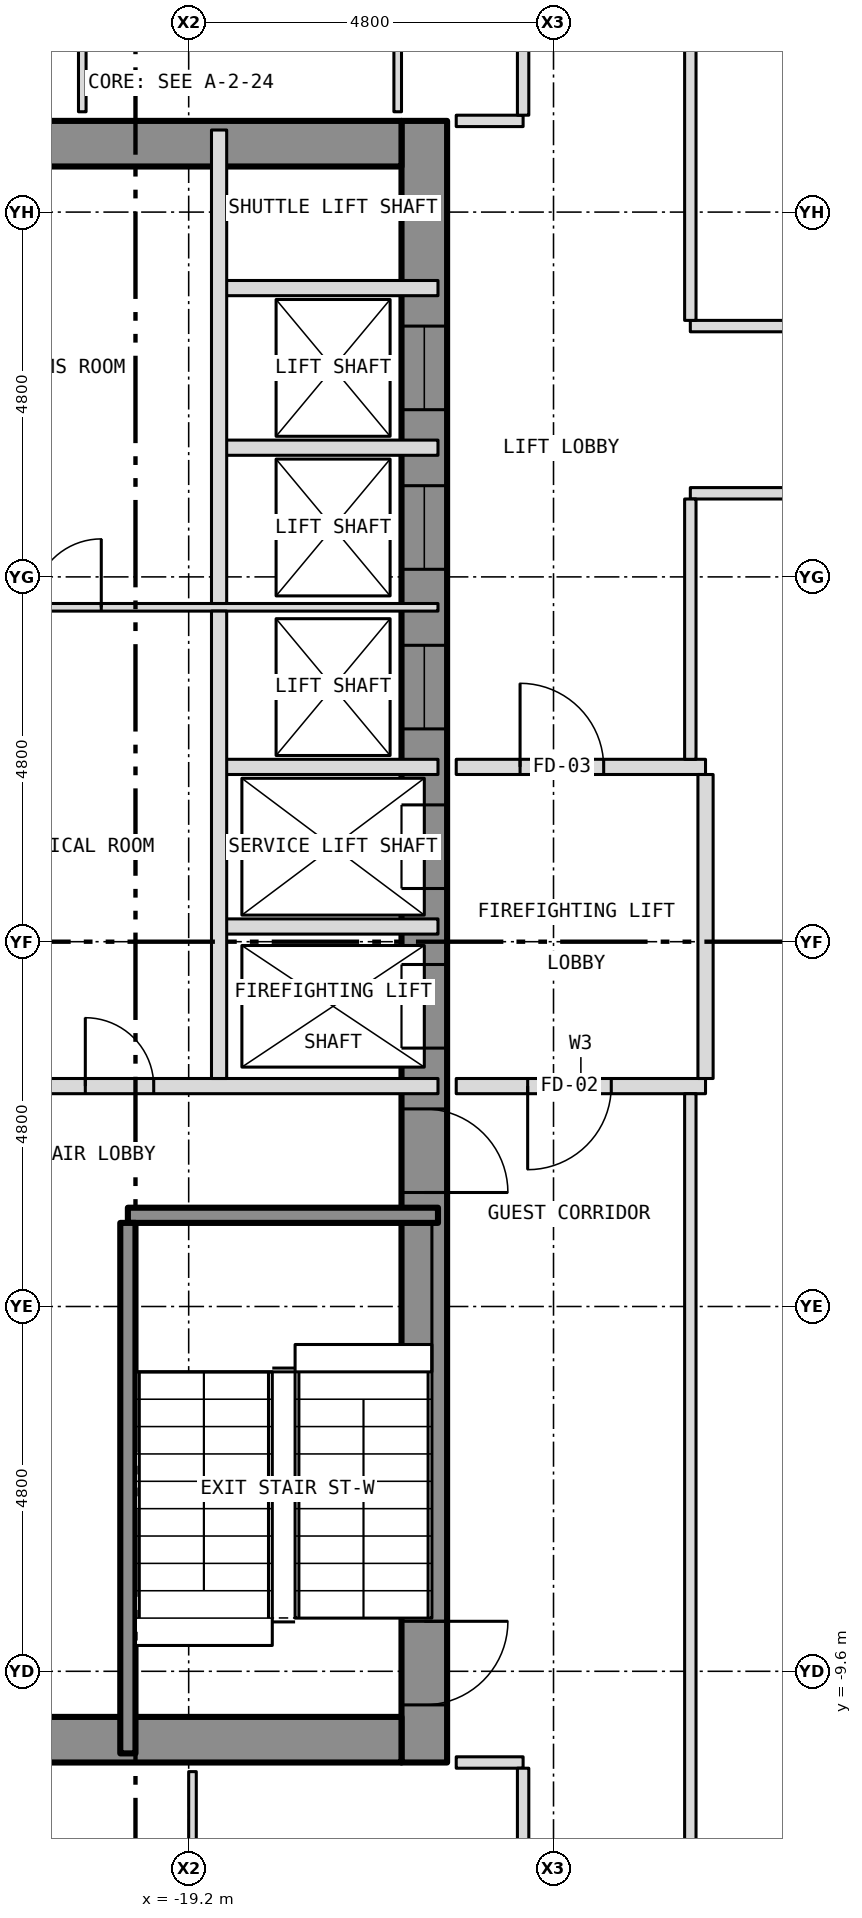
"""IFC4 building model, lengths in metres.
Left out: names, types, materials, properties, quantities, classifications, styles, units other than length and angle.
Written with IfcOpenShell. Run it as: python <this file> out.ifc"""

import sys

from ifc_helpers import new_model, si_unit, direction, frame, frame_2d, origin, place, context, subcontext, project, spatial, rectangle, extrude, element, fill, save


model = new_model("IFC4")
c1 = context("Model", 3, precision=1e-05, world=origin(), true_north=direction((0.0, 1.0)))
c2 = subcontext(c1, "Body", "Model", "MODEL_VIEW")
j1 = project(units=[si_unit("LENGTHUNIT", "METRE"), si_unit("PLANEANGLEUNIT", "RADIAN")], contexts=[c1])
p1 = place(None, origin())
s1 = spatial("IfcSite", under=j1, at=p1, CompositionType="ELEMENT")
p2 = place(p1, origin())
s2 = spatial("IfcBuilding", under=s1, at=p2, CompositionType="ELEMENT")
p3 = place(p2, frame((0.0, 0.0, 89.0)))
s3 = spatial("IfcBuildingStorey", under=s2, at=p3, CompositionType="ELEMENT", Elevation=89.0)
p4 = place(p3, frame((-16.1, -10.8, 0.0), z_axis=(0.0, 0.0, 1.0), x_axis=(0.0, 1.0, 0.0)))
e1 = element("IfcWall", 1, at=p4, inside=s3, PredefinedType="SHEAR", context=c2, shape_type="SweptSolid", body=[
    extrude(rectangle(XDim=21.6, YDim=0.6, at=frame_2d((10.8, 0.0))), origin(), (0.0, 0.0, 1.0), 3.25),
])
p5 = place(p4, frame((9.4, 0.0, 0.0)))
e2 = element("IfcOpeningElement", 2, at=p5, cuts=e1, PredefinedType="OPENING", context=c2, shape_type="SweptSolid", body=[
    extrude(rectangle(XDim=1.1, YDim=2.1, at=frame_2d((0.55, 1.05))), frame((0.0, 0.312, 0.0), z_axis=(0.0, -1.0, 0.0), x_axis=(1.0, 0.0, 0.0)), (0.0, 0.0, 1.0), 0.624),
])
p6 = place(p4, frame((11.5, 0.0, 0.0)))
e3 = element("IfcOpeningElement", 3, at=p6, cuts=e1, PredefinedType="OPENING", context=c2, shape_type="SweptSolid", body=[
    extrude(rectangle(XDim=1.1, YDim=2.1, at=frame_2d((0.55, 1.05))), frame((0.0, 0.312, 0.0), z_axis=(0.0, -1.0, 0.0), x_axis=(1.0, 0.0, 0.0)), (0.0, 0.0, 1.0), 0.624),
])
p7 = place(p4, frame((13.6, 0.0, 0.0)))
e4 = element("IfcOpeningElement", 4, at=p7, cuts=e1, PredefinedType="OPENING", context=c2, shape_type="SweptSolid", body=[
    extrude(rectangle(XDim=1.1, YDim=2.1, at=frame_2d((0.55, 1.05))), frame((0.0, 0.312, 0.0), z_axis=(0.0, -1.0, 0.0), x_axis=(1.0, 0.0, 0.0)), (0.0, 0.0, 1.0), 0.624),
])
p8 = place(p4, frame((15.7, 0.0, 0.0)))
e5 = element("IfcOpeningElement", 5, at=p8, cuts=e1, PredefinedType="OPENING", context=c2, shape_type="SweptSolid", body=[
    extrude(rectangle(XDim=1.1, YDim=2.1, at=frame_2d((0.55, 1.05))), frame((0.0, 0.312, 0.0), z_axis=(0.0, -1.0, 0.0), x_axis=(1.0, 0.0, 0.0)), (0.0, 0.0, 1.0), 0.624),
])
p9 = place(p4, frame((17.8, 0.0, 0.0)))
e6 = element("IfcOpeningElement", 6, at=p9, cuts=e1, PredefinedType="OPENING", context=c2, shape_type="SweptSolid", body=[
    extrude(rectangle(XDim=1.1, YDim=2.1, at=frame_2d((0.55, 1.05))), frame((0.0, 0.312, 0.0), z_axis=(0.0, -1.0, 0.0), x_axis=(1.0, 0.0, 0.0)), (0.0, 0.0, 1.0), 0.624),
])
p10 = place(p4, frame((0.758, 0.0, 0.0)))
e7 = element("IfcOpeningElement", 7, at=p10, cuts=e1, PredefinedType="OPENING", context=c2, shape_type="SweptSolid", body=[
    extrude(rectangle(XDim=1.1, YDim=2.1, at=frame_2d((0.55, 1.05))), frame((0.0, 0.312, 0.0), z_axis=(0.0, -1.0, 0.0), x_axis=(1.0, 0.0, 0.0)), (0.0, 0.0, 1.0), 0.624),
])
p11 = place(p4, frame((7.5, 0.0, 0.0)))
e8 = element("IfcOpeningElement", 8, at=p11, cuts=e1, PredefinedType="OPENING", context=c2, shape_type="SweptSolid", body=[
    extrude(rectangle(XDim=1.1, YDim=2.1, at=frame_2d((0.55, 1.05))), frame((0.0, 0.312, 0.0), z_axis=(0.0, -1.0, 0.0), x_axis=(1.0, 0.0, 0.0)), (0.0, 0.0, 1.0), 0.624),
])
for number, where, z_axis, x_axis in (
    (9, (-22.2, 10.5, 0.0), (0.0, 0.0, 1.0), (1.0, 0.0, 0.0)),
    (10, (-22.2, -10.5, 0.0), (0.0, 0.0, 1.0), (1.0, 0.0, 0.0)),
):
    element("IfcWall", number, at=place(p3, frame(where, z_axis=z_axis, x_axis=x_axis)), inside=s3, PredefinedType="SHEAR", context=c2, shape_type="SweptSolid", body=[
        extrude(rectangle(XDim=5.8, YDim=0.6, at=frame_2d((2.9, 0.0))), origin(), (0.0, 0.0, 1.0), 3.25),
    ])
p12 = place(p3, frame((-15.68, -10.8, 0.0), z_axis=(0.0, 0.0, 1.0), x_axis=(1.0, 0.0, 0.0)))
e11 = element("IfcWall", 11, at=p12, inside=s3, PredefinedType="PARTITIONING", context=c2, shape_type="SweptSolid", body=[
    extrude(rectangle(XDim=0.88, YDim=0.15, at=frame_2d((0.44, 0.0))), origin(), (0.0, 0.0, 1.0), 3.35),
])
p13 = place(p3, frame((-20.0, -3.6, 0.0), z_axis=(0.0, 0.0, 1.0), x_axis=(1.0, 0.0, 0.0)))
e12 = element("IfcWall", 12, at=p13, inside=s3, PredefinedType="SHEAR", context=c2, shape_type="SweptSolid", body=[
    extrude(rectangle(XDim=4.08, YDim=0.2, at=frame_2d((2.04, 0.0))), origin(), (0.0, 0.0, 1.0), 3.25),
])
p14 = place(p3, frame((-22.68, -1.9, 0.0), z_axis=(0.0, 0.0, 1.0), x_axis=(1.0, 0.0, 0.0)))
e13 = element("IfcWall", 13, at=p14, inside=s3, PredefinedType="PARTITIONING", context=c2, shape_type="SweptSolid", body=[
    extrude(rectangle(XDim=6.76, YDim=0.2, at=frame_2d((3.38, 0.0))), origin(), (0.0, 0.0, 1.0), 3.25),
])
p15 = place(p14, frame((2.12, 0.0, 0.0)))
e14 = element("IfcOpeningElement", 14, at=p15, cuts=e13, PredefinedType="OPENING", context=c2, shape_type="SweptSolid", body=[
    extrude(rectangle(XDim=0.9, YDim=2.1, at=frame_2d((0.45, 1.05))), frame((0.0, 0.112, 0.0), z_axis=(0.0, -1.0, 0.0), x_axis=(1.0, 0.0, 0.0)), (0.0, 0.0, 1.0), 0.224),
])
p16 = place(p3, frame((-15.68, -1.9, 0.0), z_axis=(0.0, 0.0, 1.0), x_axis=(1.0, 0.0, 0.0)))
e15 = element("IfcWall", 15, at=p16, inside=s3, PredefinedType="PARTITIONING", context=c2, shape_type="SweptSolid", body=[
    extrude(rectangle(XDim=3.28, YDim=0.2, at=frame_2d((1.64, 0.0))), origin(), (0.0, 0.0, 1.0), 3.35),
])
p17 = place(p16, frame((0.94, 0.0, 0.0)))
e16 = element("IfcOpeningElement", 16, at=p17, cuts=e15, PredefinedType="OPENING", context=c2, shape_type="SweptSolid", body=[
    extrude(rectangle(XDim=1.1, YDim=2.1, at=frame_2d((0.55, 1.05))), frame((0.0, 0.112, 0.0), z_axis=(0.0, -1.0, 0.0), x_axis=(1.0, 0.0, 0.0)), (0.0, 0.0, 1.0), 0.224),
])
for number, where, z_axis, x_axis in (
    (17, (-18.8, 0.2, 0.0), (0.0, 0.0, 1.0), (1.0, 0.0, 0.0)),
    (18, (-18.8, 2.3, 0.0), (0.0, 0.0, 1.0), (1.0, 0.0, 0.0)),
):
    element("IfcWall", number, at=place(p3, frame(where, z_axis=z_axis, x_axis=x_axis)), inside=s3, PredefinedType="PARTITIONING", context=c2, shape_type="SweptSolid", body=[
        extrude(rectangle(XDim=2.88, YDim=0.2, at=frame_2d((1.44, 0.0))), origin(), (0.0, 0.0, 1.0), 3.25),
    ])
p18 = place(p3, frame((-15.68, 2.3, 0.0), z_axis=(0.0, 0.0, 1.0), x_axis=(1.0, 0.0, 0.0)))
e19 = element("IfcWall", 19, at=p18, inside=s3, PredefinedType="PARTITIONING", context=c2, shape_type="SweptSolid", body=[
    extrude(rectangle(XDim=3.28, YDim=0.2, at=frame_2d((1.64, 0.0))), origin(), (0.0, 0.0, 1.0), 3.35),
])
p19 = place(p18, frame((0.84, 0.0, 0.0)))
e20 = element("IfcOpeningElement", 20, at=p19, cuts=e19, PredefinedType="OPENING", context=c2, shape_type="SweptSolid", body=[
    extrude(rectangle(XDim=1.1, YDim=2.1, at=frame_2d((0.55, 1.05))), frame((0.0, 0.112, 0.0), z_axis=(0.0, -1.0, 0.0), x_axis=(1.0, 0.0, 0.0)), (0.0, 0.0, 1.0), 0.224),
])
p20 = place(p3, frame((-22.68, 4.4, 0.0), z_axis=(0.0, 0.0, 1.0), x_axis=(1.0, 0.0, 0.0)))
e21 = element("IfcWall", 21, at=p20, inside=s3, PredefinedType="PARTITIONING", context=c2, shape_type="SweptSolid", body=[
    extrude(rectangle(XDim=6.76, YDim=0.1, at=frame_2d((3.38, 0.0))), origin(), (0.0, 0.0, 1.0), 3.25),
])
p21 = place(p20, frame((1.43, 0.0, 0.0)))
e22 = element("IfcOpeningElement", 22, at=p21, cuts=e21, PredefinedType="OPENING", context=c2, shape_type="SweptSolid", body=[
    extrude(rectangle(XDim=0.9, YDim=2.1, at=frame_2d((0.45, 1.05))), frame((0.0, 0.062, 0.0), z_axis=(0.0, -1.0, 0.0), x_axis=(1.0, 0.0, 0.0)), (0.0, 0.0, 1.0), 0.124),
])
p22 = place(p3, frame((-12.6, 5.9, 0.0), z_axis=(0.0, 0.0, 1.0), x_axis=(1.0, 0.0, 0.0)))
e23 = element("IfcWall", 23, at=p22, inside=s3, PredefinedType="PARTITIONING", context=c2, shape_type="SweptSolid", body=[
    extrude(rectangle(XDim=13.7, YDim=0.15, at=frame_2d((6.85, 0.0))), origin(), (0.0, 0.0, 1.0), 3.35),
])
p23 = place(p3, frame((-18.8, 6.5, 0.0), z_axis=(0.0, 0.0, 1.0), x_axis=(1.0, 0.0, 0.0)))
e24 = element("IfcWall", 24, at=p23, inside=s3, PredefinedType="PARTITIONING", context=c2, shape_type="SweptSolid", body=[
    extrude(rectangle(XDim=2.88, YDim=0.2, at=frame_2d((1.44, 0.0))), origin(), (0.0, 0.0, 1.0), 3.25),
])
p24 = place(p3, frame((-12.6, 8.1, 0.0), z_axis=(0.0, 0.0, 1.0), x_axis=(1.0, 0.0, 0.0)))
e25 = element("IfcWall", 25, at=p24, inside=s3, PredefinedType="PARTITIONING", context=c2, shape_type="SweptSolid", body=[
    extrude(rectangle(XDim=13.7, YDim=0.15, at=frame_2d((6.85, 0.0))), origin(), (0.0, 0.0, 1.0), 3.35),
])
p25 = place(p24, frame((6.4, 0.0, 0.0)))
e26 = element("IfcOpeningElement", 26, at=p25, cuts=e25, PredefinedType="OPENING", context=c2, shape_type="SweptSolid", body=[
    extrude(rectangle(XDim=0.9, YDim=2.1, at=frame_2d((0.45, 1.05))), frame((0.0, 0.087, 0.0), z_axis=(0.0, -1.0, 0.0), x_axis=(1.0, 0.0, 0.0)), (0.0, 0.0, 1.0), 0.174),
])
p26 = place(p3, frame((-18.8, 8.6, 0.0), z_axis=(0.0, 0.0, 1.0), x_axis=(1.0, 0.0, 0.0)))
e27 = element("IfcWall", 27, at=p26, inside=s3, PredefinedType="PARTITIONING", context=c2, shape_type="SweptSolid", body=[
    extrude(rectangle(XDim=2.88, YDim=0.2, at=frame_2d((1.44, 0.0))), origin(), (0.0, 0.0, 1.0), 3.25),
])
p27 = place(p3, frame((-15.68, 10.8, 0.0), z_axis=(0.0, 0.0, 1.0), x_axis=(1.0, 0.0, 0.0)))
e28 = element("IfcWall", 28, at=p27, inside=s3, PredefinedType="PARTITIONING", context=c2, shape_type="SweptSolid", body=[
    extrude(rectangle(XDim=0.88, YDim=0.15, at=frame_2d((0.44, 0.0))), origin(), (0.0, 0.0, 1.0), 3.35),
])
p28 = place(p3, frame((-20.6, 10.92, 0.0), z_axis=(0.0, 0.0, 1.0), x_axis=(0.0, 1.0, 0.0)))
e29 = element("IfcWall", 29, at=p28, inside=s3, PredefinedType="PARTITIONING", context=c2, shape_type="SweptSolid", body=[
    extrude(rectangle(XDim=3.03, YDim=0.1, at=frame_2d((1.515, 0.0))), origin(), (0.0, 0.0, 1.0), 3.35),
])
p29 = place(p28, frame((1.67, 0.0, 0.0)))
e30 = element("IfcOpeningElement", 30, at=p29, cuts=e29, PredefinedType="OPENING", context=c2, shape_type="SweptSolid", body=[
    extrude(rectangle(XDim=0.9, YDim=2.1, at=frame_2d((0.45, 1.05))), frame((0.0, 0.062, 0.0), z_axis=(0.0, -1.0, 0.0), x_axis=(1.0, 0.0, 0.0)), (0.0, 0.0, 1.0), 0.124),
])
p30 = place(p3, frame((-20.0, -10.68, 0.0), z_axis=(0.0, 0.0, 1.0), x_axis=(0.0, 1.0, 0.0)))
e31 = element("IfcWall", 31, at=p30, inside=s3, PredefinedType="SHEAR", context=c2, shape_type="SweptSolid", body=[
    extrude(rectangle(XDim=6.98, YDim=0.2, at=frame_2d((3.49, 0.0))), origin(), (0.0, 0.0, 1.0), 3.25),
])
p31 = place(p3, frame((-19.15, -18.78, 0.0), z_axis=(0.0, 0.0, 1.0), x_axis=(0.0, 1.0, 0.0)))
e32 = element("IfcWall", 32, at=p31, inside=s3, PredefinedType="PARTITIONING", context=c2, shape_type="SweptSolid", body=[
    extrude(rectangle(XDim=7.86, YDim=0.1, at=frame_2d((3.93, 0.0))), origin(), (0.0, 0.0, 1.0), 2.817),
])
p32 = place(p31, frame((3.78, 0.0, 0.0)))
e33 = element("IfcOpeningElement", 33, at=p32, cuts=e32, PredefinedType="OPENING", context=c2, shape_type="SweptSolid", body=[
    extrude(rectangle(XDim=0.9, YDim=2.1, at=frame_2d((0.45, 1.05))), frame((0.0, 0.062, 0.0), z_axis=(0.0, -1.0, 0.0), x_axis=(1.0, 0.0, 0.0)), (0.0, 0.0, 1.0), 0.124),
])
p33 = place(p3, frame((-18.8, -1.8, 0.0), z_axis=(0.0, 0.0, 1.0), x_axis=(0.0, 1.0, 0.0)))
e34 = element("IfcWall", 34, at=p33, inside=s3, PredefinedType="PARTITIONING", context=c2, shape_type="SweptSolid", body=[
    extrude(rectangle(XDim=6.15, YDim=0.2, at=frame_2d((3.075, 0.0))), origin(), (0.0, 0.0, 1.0), 3.25),
])
p34 = place(p3, frame((-18.8, 4.45, 0.0), z_axis=(0.0, 0.0, 1.0), x_axis=(0.0, 1.0, 0.0)))
e35 = element("IfcWall", 35, at=p34, inside=s3, PredefinedType="PARTITIONING", context=c2, shape_type="SweptSolid", body=[
    extrude(rectangle(XDim=6.23, YDim=0.2, at=frame_2d((3.115, 0.0))), origin(), (0.0, 0.0, 1.0), 3.25),
])
p35 = place(p3, frame((-16.45, 10.92, 0.0), z_axis=(0.0, 0.0, 1.0), x_axis=(0.0, 1.0, 0.0)))
e36 = element("IfcWall", 36, at=p35, inside=s3, PredefinedType="PARTITIONING", context=c2, shape_type="SweptSolid", body=[
    extrude(rectangle(XDim=12.36, YDim=0.1, at=frame_2d((6.18, 0.0))), origin(), (0.0, 0.0, 1.0), 3.35),
])
p36 = place(p35, frame((5.43, 0.0, 0.0)))
e37 = element("IfcOpeningElement", 37, at=p36, cuts=e36, PredefinedType="OPENING", context=c2, shape_type="SweptSolid", body=[
    extrude(rectangle(XDim=0.9, YDim=2.1, at=frame_2d((0.45, 1.05))), frame((0.0, 0.062, 0.0), z_axis=(0.0, -1.0, 0.0), x_axis=(1.0, 0.0, 0.0)), (0.0, 0.0, 1.0), 0.124),
])
p37 = place(p3, frame((-14.8, -14.725, 0.0), z_axis=(0.0, 0.0, 1.0), x_axis=(0.0, 1.0, 0.0)))
e38 = element("IfcWall", 38, at=p37, inside=s3, PredefinedType="PARTITIONING", context=c2, shape_type="SweptSolid", body=[
    extrude(rectangle(XDim=3.85, YDim=0.15, at=frame_2d((1.925, 0.0))), origin(), (0.0, 0.0, 1.0), 3.35),
])
p38 = place(p37, frame((0.525, 0.0, 0.0)))
e39 = element("IfcOpeningElement", 39, at=p38, cuts=e38, PredefinedType="OPENING", context=c2, shape_type="SweptSolid", body=[
    extrude(rectangle(XDim=1.0, YDim=2.1, at=frame_2d((0.5, 1.05))), frame((0.0, 0.087, 0.0), z_axis=(0.0, -1.0, 0.0), x_axis=(1.0, 0.0, 0.0)), (0.0, 0.0, 1.0), 0.174),
])
p39 = place(p3, frame((-14.8, 10.875, 0.0), z_axis=(0.0, 0.0, 1.0), x_axis=(0.0, 1.0, 0.0)))
e40 = element("IfcWall", 40, at=p39, inside=s3, PredefinedType="PARTITIONING", context=c2, shape_type="SweptSolid", body=[
    extrude(rectangle(XDim=3.85, YDim=0.15, at=frame_2d((1.925, 0.0))), origin(), (0.0, 0.0, 1.0), 3.35),
])
p40 = place(p39, frame((2.325, 0.0, 0.0)))
e41 = element("IfcOpeningElement", 41, at=p40, cuts=e40, PredefinedType="OPENING", context=c2, shape_type="SweptSolid", body=[
    extrude(rectangle(XDim=1.0, YDim=2.1, at=frame_2d((0.5, 1.05))), frame((0.0, 0.087, 0.0), z_axis=(0.0, -1.0, 0.0), x_axis=(1.0, 0.0, 0.0)), (0.0, 0.0, 1.0), 0.174),
])
p41 = place(p3, frame((-12.6, -12.525, 0.0), z_axis=(0.0, 0.0, 1.0), x_axis=(0.0, 1.0, 0.0)))
e42 = element("IfcWall", 42, at=p41, inside=s3, PredefinedType="PARTITIONING", context=c2, shape_type="SweptSolid", body=[
    extrude(rectangle(XDim=10.525, YDim=0.15, at=frame_2d((5.262, 0.0))), origin(), (0.0, 0.0, 1.0), 3.35),
])
p42 = place(p3, frame((-12.6, 2.4, 0.0), z_axis=(0.0, 0.0, 1.0), x_axis=(0.0, 1.0, 0.0)))
e43 = element("IfcWall", 43, at=p42, inside=s3, PredefinedType="PARTITIONING", context=c2, shape_type="SweptSolid", body=[
    extrude(rectangle(XDim=3.425, YDim=0.15, at=frame_2d((1.712, 0.0))), origin(), (0.0, 0.0, 1.0), 3.35),
])
p43 = place(p3, frame((-12.6, 8.175, 0.0), z_axis=(0.0, 0.0, 1.0), x_axis=(0.0, 1.0, 0.0)))
e44 = element("IfcWall", 44, at=p43, inside=s3, PredefinedType="PARTITIONING", context=c2, shape_type="SweptSolid", body=[
    extrude(rectangle(XDim=4.35, YDim=0.15, at=frame_2d((2.175, 0.0))), origin(), (0.0, 0.0, 1.0), 3.35),
])
p44 = place(p3, frame((-12.4, -1.8, 0.0), z_axis=(0.0, 0.0, 1.0), x_axis=(0.0, 1.0, 0.0)))
e45 = element("IfcWall", 45, at=p44, inside=s3, PredefinedType="PARTITIONING", context=c2, shape_type="SweptSolid", body=[
    extrude(rectangle(XDim=4.0, YDim=0.2, at=frame_2d((2.0, 0.0))), origin(), (0.0, 0.0, 1.0), 3.35),
])
p45 = place(p5, origin())
e46 = element("IfcDoor", 46, at=p45, inside=s3, OperationType="SLIDING_TO_LEFT", PredefinedType="DOOR", context=c2, shape_type="SweptSolid", body=[
    extrude(rectangle(XDim=1.1, YDim=2.1, at=frame_2d((0.55, 1.05))), frame((0.0, 0.025, 0.0), z_axis=(0.0, -1.0, 0.0), x_axis=(1.0, 0.0, 0.0)), (0.0, 0.0, 1.0), 0.05),
])
fill(e2, e46)
p46 = place(p6, origin())
e47 = element("IfcDoor", 47, at=p46, inside=s3, OperationType="SLIDING_TO_LEFT", PredefinedType="DOOR", context=c2, shape_type="SweptSolid", body=[
    extrude(rectangle(XDim=1.1, YDim=2.1, at=frame_2d((0.55, 1.05))), frame((0.0, 0.025, 0.0), z_axis=(0.0, -1.0, 0.0), x_axis=(1.0, 0.0, 0.0)), (0.0, 0.0, 1.0), 0.05),
])
fill(e3, e47)
p47 = place(p7, origin())
e48 = element("IfcDoor", 48, at=p47, inside=s3, OperationType="SLIDING_TO_LEFT", PredefinedType="DOOR", context=c2, shape_type="SweptSolid", body=[
    extrude(rectangle(XDim=1.1, YDim=2.1, at=frame_2d((0.55, 1.05))), frame((0.0, 0.025, 0.0), z_axis=(0.0, -1.0, 0.0), x_axis=(1.0, 0.0, 0.0)), (0.0, 0.0, 1.0), 0.05),
])
fill(e4, e48)
p48 = place(p8, origin())
e49 = element("IfcDoor", 49, at=p48, inside=s3, OperationType="SLIDING_TO_LEFT", PredefinedType="DOOR", context=c2, shape_type="SweptSolid", body=[
    extrude(rectangle(XDim=1.1, YDim=2.1, at=frame_2d((0.55, 1.05))), frame((0.0, 0.025, 0.0), z_axis=(0.0, -1.0, 0.0), x_axis=(1.0, 0.0, 0.0)), (0.0, 0.0, 1.0), 0.05),
])
fill(e5, e49)
p49 = place(p9, origin())
e50 = element("IfcDoor", 50, at=p49, inside=s3, OperationType="SLIDING_TO_LEFT", PredefinedType="DOOR", context=c2, shape_type="SweptSolid", body=[
    extrude(rectangle(XDim=1.1, YDim=2.1, at=frame_2d((0.55, 1.05))), frame((0.0, 0.025, 0.0), z_axis=(0.0, -1.0, 0.0), x_axis=(1.0, 0.0, 0.0)), (0.0, 0.0, 1.0), 0.05),
])
fill(e6, e50)
p50 = place(p10, origin())
e51 = element("IfcDoor", 51, at=p50, inside=s3, OperationType="SINGLE_SWING_RIGHT", PredefinedType="DOOR", context=c2, shape_type="SweptSolid", body=[
    extrude(rectangle(XDim=1.1, YDim=2.1, at=frame_2d((0.55, 1.05))), frame((0.0, 0.025, 0.0), z_axis=(0.0, -1.0, 0.0), x_axis=(1.0, 0.0, 0.0)), (0.0, 0.0, 1.0), 0.05),
])
fill(e7, e51)
p51 = place(p11, origin())
e52 = element("IfcDoor", 52, at=p51, inside=s3, OperationType="SINGLE_SWING_LEFT", PredefinedType="DOOR", context=c2, shape_type="SweptSolid", body=[
    extrude(rectangle(XDim=1.1, YDim=2.1, at=frame_2d((0.55, 1.05))), frame((0.0, 0.025, 0.0), z_axis=(0.0, -1.0, 0.0), x_axis=(1.0, 0.0, 0.0)), (0.0, 0.0, 1.0), 0.05),
])
fill(e8, e52)
p52 = place(p15, origin())
e53 = element("IfcDoor", 53, at=p52, inside=s3, OperationType="SINGLE_SWING_LEFT", PredefinedType="DOOR", context=c2, shape_type="SweptSolid", body=[
    extrude(rectangle(XDim=0.9, YDim=2.1, at=frame_2d((0.45, 1.05))), frame((0.0, 0.025, 0.0), z_axis=(0.0, -1.0, 0.0), x_axis=(1.0, 0.0, 0.0)), (0.0, 0.0, 1.0), 0.05),
])
fill(e14, e53)
p53 = place(p21, origin())
e54 = element("IfcDoor", 54, at=p53, inside=s3, OperationType="SINGLE_SWING_RIGHT", PredefinedType="DOOR", context=c2, shape_type="SweptSolid", body=[
    extrude(rectangle(XDim=0.9, YDim=2.1, at=frame_2d((0.45, 1.05))), frame((0.0, 0.025, 0.0), z_axis=(0.0, -1.0, 0.0), x_axis=(1.0, 0.0, 0.0)), (0.0, 0.0, 1.0), 0.05),
])
fill(e22, e54)
p54 = place(p17, origin())
e55 = element("IfcDoor", 55, at=p54, inside=s3, OperationType="SINGLE_SWING_LEFT", PredefinedType="DOOR", context=c2, shape_type="SweptSolid", body=[
    extrude(rectangle(XDim=1.1, YDim=2.1, at=frame_2d((0.55, 1.05))), frame((0.0, 0.025, 0.0), z_axis=(0.0, -1.0, 0.0), x_axis=(1.0, 0.0, 0.0)), (0.0, 0.0, 1.0), 0.05),
])
fill(e16, e55)
p55 = place(p19, origin())
e56 = element("IfcDoor", 56, at=p55, inside=s3, OperationType="SINGLE_SWING_LEFT", PredefinedType="DOOR", context=c2, shape_type="SweptSolid", body=[
    extrude(rectangle(XDim=1.1, YDim=2.1, at=frame_2d((0.55, 1.05))), frame((0.0, 0.025, 0.0), z_axis=(0.0, -1.0, 0.0), x_axis=(1.0, 0.0, 0.0)), (0.0, 0.0, 1.0), 0.05),
])
fill(e20, e56)
save(model, sys.argv[1])
